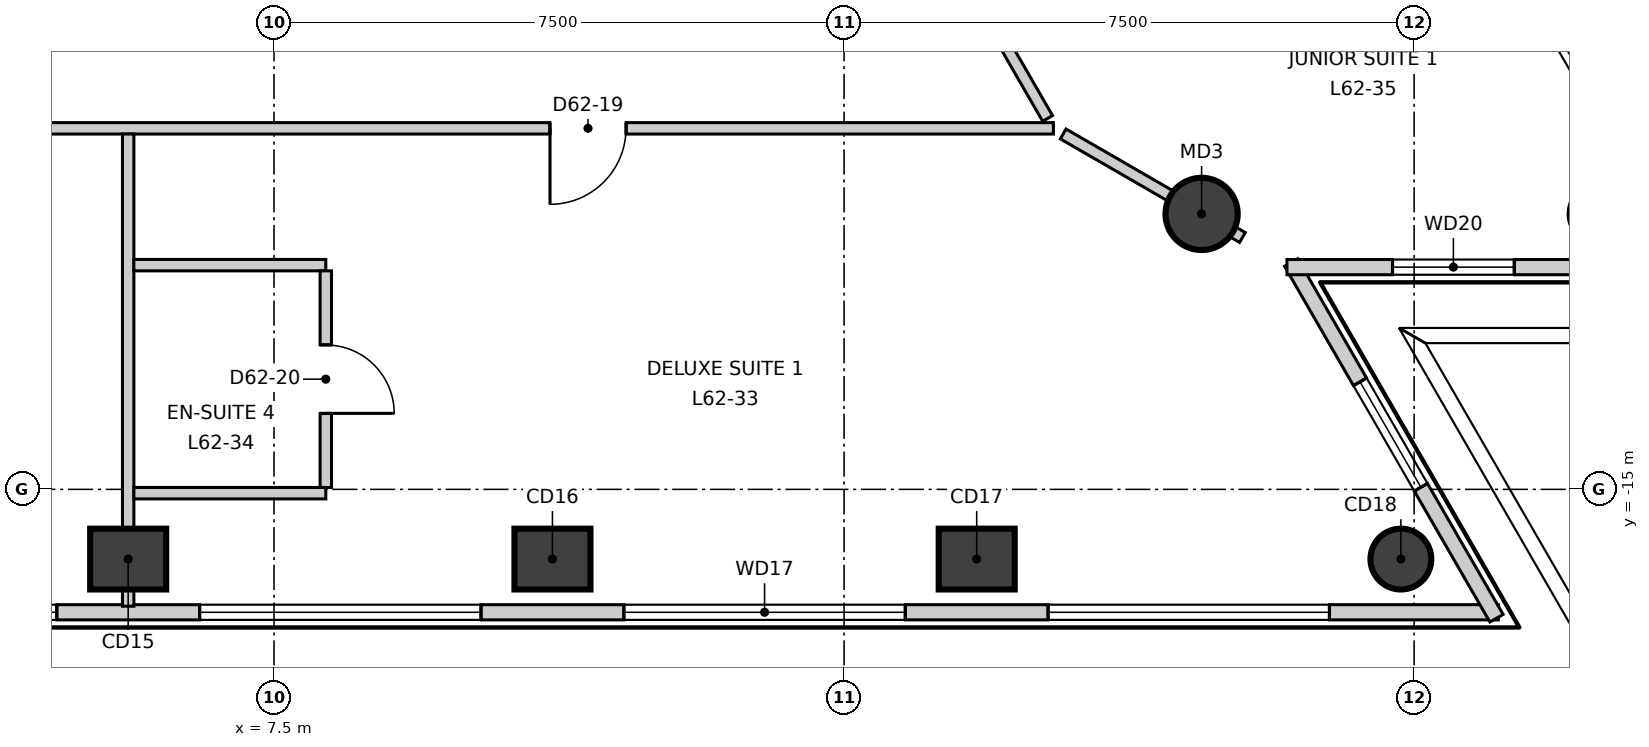
"""IFC4 building model, lengths in metres.
Left out: names, types, materials, properties, quantities, classifications, styles, units other than length and angle.
Written with IfcOpenShell. Run it as: python <this file> out.ifc"""

import sys

from ifc_helpers import new_model, si_unit, direction, frame, frame_2d, origin, origin_2d, place, context, subcontext, project, spatial, rectangle, circle, extrude, element, fill, save


model = new_model("IFC4")
c1 = context("Model", 3, precision=1e-05, world=origin(), true_north=direction((0.0, 1.0)))
c2 = subcontext(c1, "Body", "Model", "MODEL_VIEW")
j1 = project(units=[si_unit("LENGTHUNIT", "METRE"), si_unit("PLANEANGLEUNIT", "RADIAN")], contexts=[c1])
p1 = place(None, origin())
s1 = spatial("IfcSite", under=j1, at=p1, CompositionType="ELEMENT")
p2 = place(p1, origin())
s2 = spatial("IfcBuilding", under=s1, at=p2, CompositionType="ELEMENT")
p3 = place(p2, frame((0.0, 0.0, 268.3)))
s3 = spatial("IfcBuildingStorey", under=s2, at=p3, CompositionType="ELEMENT", Elevation=268.3)
for number, where, z_axis, x_axis in (
    (1, (5.581, -15.917, -0.3), (0.0, 0.0, 1.0), (1.0, 0.0, 0.0)),
    (2, (11.163, -15.917, -0.3), (0.0, 0.0, 1.0), (1.0, 0.0, 0.0)),
    (3, (16.745, -15.917, -0.3), (0.0, 0.0, 1.0), (1.0, 0.0, 0.0)),
):
    element("IfcColumn", number, at=place(p3, frame(where, z_axis=z_axis, x_axis=x_axis)), inside=s3, PredefinedType="COLUMN", context=c2, shape_type="SweptSolid", body=[
        extrude(rectangle(XDim=1.0, YDim=0.8, at=origin_2d()), origin(), (0.0, 0.0, 1.0), 3.6),
    ])
p4 = place(p3, frame((22.326, -15.917, -0.3), z_axis=(0.0, 0.0, 1.0), x_axis=(1.0, 0.0, 0.0)))
e4 = element("IfcColumn", 4, at=p4, inside=s3, PredefinedType="COLUMN", context=c2, shape_type="SweptSolid", body=[
    extrude(circle(Radius=0.4, at=origin_2d()), origin(), (0.0, 0.0, 1.0), 3.6),
])
p5 = place(p3, frame((19.704, -11.376, -0.3), z_axis=(0.0, 0.0, 1.0), x_axis=(1.0, 0.0, 0.0)))
e5 = element("IfcColumn", 5, at=p5, inside=s3, PredefinedType="COLUMN", context=c2, shape_type="SweptSolid", body=[
    extrude(circle(Radius=0.475, at=origin_2d()), origin(), (0.0, 0.0, 1.0), 3.6),
])
p6 = place(p3, frame((-23.629, -16.617, 0.0), z_axis=(0.0, 0.0, 1.0), x_axis=(1.0, 0.0, 0.0)))
e6 = element("IfcWall", 6, at=p6, inside=s3, PredefinedType="ELEMENTEDWALL", context=c2, shape_type="SweptSolid", body=[
    extrude(rectangle(XDim=47.238, YDim=0.2, at=frame_2d((23.619, 0.0))), origin(), (0.0, 0.0, 1.0), 3.3),
])
p7 = place(p6, frame((2.244, 0.0, 0.9)))
e7 = element("IfcOpeningElement", 7, at=p7, cuts=e6, PredefinedType="OPENING", context=c2, shape_type="SweptSolid", body=[
    extrude(rectangle(XDim=3.7, YDim=2.2, at=frame_2d((1.85, 1.1))), frame((0.0, 0.11, 0.0), z_axis=(0.0, -1.0, 0.0), x_axis=(1.0, 0.0, 0.0)), (0.0, 0.0, 1.0), 0.22),
])
p8 = place(p6, frame((7.825, 0.0, 0.9)))
e8 = element("IfcOpeningElement", 8, at=p8, cuts=e6, PredefinedType="OPENING", context=c2, shape_type="SweptSolid", body=[
    extrude(rectangle(XDim=3.7, YDim=2.2, at=frame_2d((1.85, 1.1))), frame((0.0, 0.11, 0.0), z_axis=(0.0, -1.0, 0.0), x_axis=(1.0, 0.0, 0.0)), (0.0, 0.0, 1.0), 0.22),
])
p9 = place(p6, frame((13.407, 0.0, 0.9)))
e9 = element("IfcOpeningElement", 9, at=p9, cuts=e6, PredefinedType="OPENING", context=c2, shape_type="SweptSolid", body=[
    extrude(rectangle(XDim=3.7, YDim=2.2, at=frame_2d((1.85, 1.1))), frame((0.0, 0.11, 0.0), z_axis=(0.0, -1.0, 0.0), x_axis=(1.0, 0.0, 0.0)), (0.0, 0.0, 1.0), 0.22),
])
p10 = place(p6, frame((18.988, 0.0, 0.9)))
e10 = element("IfcOpeningElement", 10, at=p10, cuts=e6, PredefinedType="OPENING", context=c2, shape_type="SweptSolid", body=[
    extrude(rectangle(XDim=3.7, YDim=2.2, at=frame_2d((1.85, 1.1))), frame((0.0, 0.11, 0.0), z_axis=(0.0, -1.0, 0.0), x_axis=(1.0, 0.0, 0.0)), (0.0, 0.0, 1.0), 0.22),
])
p11 = place(p6, frame((24.57, 0.0, 0.9)))
e11 = element("IfcOpeningElement", 11, at=p11, cuts=e6, PredefinedType="OPENING", context=c2, shape_type="SweptSolid", body=[
    extrude(rectangle(XDim=3.7, YDim=2.2, at=frame_2d((1.85, 1.1))), frame((0.0, 0.11, 0.0), z_axis=(0.0, -1.0, 0.0), x_axis=(1.0, 0.0, 0.0)), (0.0, 0.0, 1.0), 0.22),
])
p12 = place(p6, frame((30.151, 0.0, 0.9)))
e12 = element("IfcOpeningElement", 12, at=p12, cuts=e6, PredefinedType="OPENING", context=c2, shape_type="SweptSolid", body=[
    extrude(rectangle(XDim=3.7, YDim=2.2, at=frame_2d((1.85, 1.1))), frame((0.0, 0.11, 0.0), z_axis=(0.0, -1.0, 0.0), x_axis=(1.0, 0.0, 0.0)), (0.0, 0.0, 1.0), 0.22),
])
p13 = place(p6, frame((35.733, 0.0, 0.9)))
e13 = element("IfcOpeningElement", 13, at=p13, cuts=e6, PredefinedType="OPENING", context=c2, shape_type="SweptSolid", body=[
    extrude(rectangle(XDim=3.7, YDim=2.2, at=frame_2d((1.85, 1.1))), frame((0.0, 0.11, 0.0), z_axis=(0.0, -1.0, 0.0), x_axis=(1.0, 0.0, 0.0)), (0.0, 0.0, 1.0), 0.22),
])
p14 = place(p6, frame((41.314, 0.0, 0.9)))
e14 = element("IfcOpeningElement", 14, at=p14, cuts=e6, PredefinedType="OPENING", context=c2, shape_type="SweptSolid", body=[
    extrude(rectangle(XDim=3.7, YDim=2.2, at=frame_2d((1.85, 1.1))), frame((0.0, 0.11, 0.0), z_axis=(0.0, -1.0, 0.0), x_axis=(1.0, 0.0, 0.0)), (0.0, 0.0, 1.0), 0.22),
])
p15 = place(p3, frame((23.584, -16.695, 0.0), z_axis=(0.0, 0.0, 1.0), x_axis=(-0.499972735707, 0.866041144259, 0.0)))
e15 = element("IfcWall", 15, at=p15, inside=s3, PredefinedType="ELEMENTEDWALL", context=c2, shape_type="SweptSolid", body=[
    extrude(rectangle(XDim=5.404, YDim=0.2, at=frame_2d((2.702, 0.0))), origin(), (0.0, 0.0, 1.0), 3.3),
])
p16 = place(p15, frame((1.99, 0.0, 0.9)))
e16 = element("IfcOpeningElement", 16, at=p16, cuts=e15, PredefinedType="OPENING", context=c2, shape_type="SweptSolid", body=[
    extrude(rectangle(XDim=1.6, YDim=2.2, at=frame_2d((0.8, 1.1))), frame((0.0, 0.11, 0.0), z_axis=(0.0, -1.0, 0.0), x_axis=(1.0, 0.0, 0.0)), (0.0, 0.0, 1.0), 0.22),
])
p17 = place(p3, frame((20.827, -12.076, 0.0), z_axis=(0.0, 0.0, 1.0), x_axis=(1.0, 0.0, 0.0)))
e17 = element("IfcWall", 17, at=p17, inside=s3, PredefinedType="ELEMENTEDWALL", context=c2, shape_type="SweptSolid", body=[
    extrude(rectangle(XDim=5.403, YDim=0.2, at=frame_2d((2.702, 0.0))), origin(), (0.0, 0.0, 1.0), 3.3),
])
p18 = place(p17, frame((1.39, 0.0, 0.9)))
e18 = element("IfcOpeningElement", 18, at=p18, cuts=e17, PredefinedType="OPENING", context=c2, shape_type="SweptSolid", body=[
    extrude(rectangle(XDim=1.6, YDim=2.2, at=frame_2d((0.8, 1.1))), frame((0.0, 0.11, 0.0), z_axis=(0.0, -1.0, 0.0), x_axis=(1.0, 0.0, 0.0)), (0.0, 0.0, 1.0), 0.22),
])
p19 = place(p3, frame((26.205, -12.154, 0.0), z_axis=(0.0, 0.0, 1.0), x_axis=(-0.49999909388, 0.866025926932, 0.0)))
e19 = element("IfcWall", 19, at=p19, inside=s3, PredefinedType="ELEMENTEDWALL", context=c2, shape_type="SweptSolid", body=[
    extrude(rectangle(XDim=47.236, YDim=0.2, at=frame_2d((23.618, 0.0))), origin(), (0.0, 0.0, 1.0), 3.3),
])
p20 = place(p19, frame((2.243, 0.0, 0.9)))
e20 = element("IfcOpeningElement", 20, at=p20, cuts=e19, PredefinedType="OPENING", context=c2, shape_type="SweptSolid", body=[
    extrude(rectangle(XDim=3.7, YDim=2.2, at=frame_2d((1.85, 1.1))), frame((0.0, 0.11, 0.0), z_axis=(0.0, -1.0, 0.0), x_axis=(1.0, 0.0, 0.0)), (0.0, 0.0, 1.0), 0.22),
])
p21 = place(p19, frame((7.825, 0.0, 0.9)))
e21 = element("IfcOpeningElement", 21, at=p21, cuts=e19, PredefinedType="OPENING", context=c2, shape_type="SweptSolid", body=[
    extrude(rectangle(XDim=3.7, YDim=2.2, at=frame_2d((1.85, 1.1))), frame((0.0, 0.11, 0.0), z_axis=(0.0, -1.0, 0.0), x_axis=(1.0, 0.0, 0.0)), (0.0, 0.0, 1.0), 0.22),
])
p22 = place(p19, frame((13.406, 0.0, 0.9)))
e22 = element("IfcOpeningElement", 22, at=p22, cuts=e19, PredefinedType="OPENING", context=c2, shape_type="SweptSolid", body=[
    extrude(rectangle(XDim=3.7, YDim=2.2, at=frame_2d((1.85, 1.1))), frame((0.0, 0.11, 0.0), z_axis=(0.0, -1.0, 0.0), x_axis=(1.0, 0.0, 0.0)), (0.0, 0.0, 1.0), 0.22),
])
p23 = place(p19, frame((18.987, 0.0, 0.9)))
e23 = element("IfcOpeningElement", 23, at=p23, cuts=e19, PredefinedType="OPENING", context=c2, shape_type="SweptSolid", body=[
    extrude(rectangle(XDim=3.7, YDim=2.2, at=frame_2d((1.85, 1.1))), frame((0.0, 0.11, 0.0), z_axis=(0.0, -1.0, 0.0), x_axis=(1.0, 0.0, 0.0)), (0.0, 0.0, 1.0), 0.22),
])
p24 = place(p19, frame((24.569, 0.0, 0.9)))
e24 = element("IfcOpeningElement", 24, at=p24, cuts=e19, PredefinedType="OPENING", context=c2, shape_type="SweptSolid", body=[
    extrude(rectangle(XDim=3.7, YDim=2.2, at=frame_2d((1.85, 1.1))), frame((0.0, 0.11, 0.0), z_axis=(0.0, -1.0, 0.0), x_axis=(1.0, 0.0, 0.0)), (0.0, 0.0, 1.0), 0.22),
])
p25 = place(p19, frame((30.15, 0.0, 0.9)))
e25 = element("IfcOpeningElement", 25, at=p25, cuts=e19, PredefinedType="OPENING", context=c2, shape_type="SweptSolid", body=[
    extrude(rectangle(XDim=3.7, YDim=2.2, at=frame_2d((1.85, 1.1))), frame((0.0, 0.11, 0.0), z_axis=(0.0, -1.0, 0.0), x_axis=(1.0, 0.0, 0.0)), (0.0, 0.0, 1.0), 0.22),
])
p26 = place(p19, frame((35.732, 0.0, 0.9)))
e26 = element("IfcOpeningElement", 26, at=p26, cuts=e19, PredefinedType="OPENING", context=c2, shape_type="SweptSolid", body=[
    extrude(rectangle(XDim=3.7, YDim=2.2, at=frame_2d((1.85, 1.1))), frame((0.0, 0.11, 0.0), z_axis=(0.0, -1.0, 0.0), x_axis=(1.0, 0.0, 0.0)), (0.0, 0.0, 1.0), 0.22),
])
p27 = place(p19, frame((41.313, 0.0, 0.9)))
e27 = element("IfcOpeningElement", 27, at=p27, cuts=e19, PredefinedType="OPENING", context=c2, shape_type="SweptSolid", body=[
    extrude(rectangle(XDim=3.7, YDim=2.2, at=frame_2d((1.85, 1.1))), frame((0.0, 0.11, 0.0), z_axis=(0.0, -1.0, 0.0), x_axis=(1.0, 0.0, 0.0)), (0.0, 0.0, 1.0), 0.22),
])
p28 = place(p3, frame((-17.604, -10.25, 0.0), z_axis=(0.0, 0.0, 1.0), x_axis=(1.0, 0.0, 0.0)))
e28 = element("IfcWall", 28, at=p28, inside=s3, PredefinedType="PARTITIONING", context=c2, shape_type="SweptSolid", body=[
    extrude(rectangle(XDim=35.358, YDim=0.15, at=frame_2d((17.679, 0.0))), origin(), (0.0, 0.0, 1.0), 3.3),
])
p29 = place(p28, frame((2.6, 0.0, 0.0)))
e29 = element("IfcOpeningElement", 29, at=p29, cuts=e28, PredefinedType="OPENING", context=c2, shape_type="SweptSolid", body=[
    extrude(rectangle(XDim=1.0, YDim=2.1, at=frame_2d((0.5, 1.05))), frame((0.0, 0.085, 0.0), z_axis=(0.0, -1.0, 0.0), x_axis=(1.0, 0.0, 0.0)), (0.0, 0.0, 1.0), 0.17),
])
p30 = place(p28, frame((8.391, 0.0, 0.0)))
e30 = element("IfcOpeningElement", 30, at=p30, cuts=e28, PredefinedType="OPENING", context=c2, shape_type="SweptSolid", body=[
    extrude(rectangle(XDim=1.0, YDim=2.1, at=frame_2d((0.5, 1.05))), frame((0.0, 0.085, 0.0), z_axis=(0.0, -1.0, 0.0), x_axis=(1.0, 0.0, 0.0)), (0.0, 0.0, 1.0), 0.17),
])
p31 = place(p28, frame((20.473, 0.0, 0.0)))
e31 = element("IfcOpeningElement", 31, at=p31, cuts=e28, PredefinedType="OPENING", context=c2, shape_type="SweptSolid", body=[
    extrude(rectangle(XDim=1.0, YDim=2.1, at=frame_2d((0.5, 1.05))), frame((0.0, 0.085, 0.0), z_axis=(0.0, -1.0, 0.0), x_axis=(1.0, 0.0, 0.0)), (0.0, 0.0, 1.0), 0.17),
])
p32 = place(p28, frame((14.973, 0.0, 0.0)))
e32 = element("IfcOpeningElement", 32, at=p32, cuts=e28, PredefinedType="OPENING", context=c2, shape_type="SweptSolid", body=[
    extrude(rectangle(XDim=0.9, YDim=2.1, at=frame_2d((0.45, 1.05))), frame((0.0, 0.085, 0.0), z_axis=(0.0, -1.0, 0.0), x_axis=(1.0, 0.0, 0.0)), (0.0, 0.0, 1.0), 0.17),
])
p33 = place(p28, frame((17.173, 0.0, 0.0)))
e33 = element("IfcOpeningElement", 33, at=p33, cuts=e28, PredefinedType="OPENING", context=c2, shape_type="SweptSolid", body=[
    extrude(rectangle(XDim=0.9, YDim=2.1, at=frame_2d((0.45, 1.05))), frame((0.0, 0.085, 0.0), z_axis=(0.0, -1.0, 0.0), x_axis=(1.0, 0.0, 0.0)), (0.0, 0.0, 1.0), 0.17),
])
p34 = place(p28, frame((28.735, 0.0, 0.0)))
e34 = element("IfcOpeningElement", 34, at=p34, cuts=e28, PredefinedType="OPENING", context=c2, shape_type="SweptSolid", body=[
    extrude(rectangle(XDim=1.0, YDim=2.1, at=frame_2d((0.5, 1.05))), frame((0.0, 0.085, 0.0), z_axis=(0.0, -1.0, 0.0), x_axis=(1.0, 0.0, 0.0)), (0.0, 0.0, 1.0), 0.17),
])
p35 = place(p3, frame((17.883, -10.324, 0.0), z_axis=(0.0, 0.0, 1.0), x_axis=(0.865910811146, -0.500198427768, 0.0)))
e35 = element("IfcWall", 35, at=p35, inside=s3, PredefinedType="PARTITIONING", context=c2, shape_type="SweptSolid", body=[
    extrude(rectangle(XDim=2.723, YDim=0.15, at=frame_2d((1.362, 0.0))), origin(), (0.0, 0.0, 1.0), 2.8),
])
p36 = place(p3, frame((0.075, 20.37, 0.0), z_axis=(0.0, 0.0, 1.0), x_axis=(0.499988971979, -0.866031770721, 0.0)))
e36 = element("IfcWall", 36, at=p36, inside=s3, PredefinedType="PARTITIONING", context=c2, shape_type="SweptSolid", body=[
    extrude(rectangle(XDim=35.207, YDim=0.15, at=frame_2d((17.604, 0.0))), origin(), (0.0, 0.0, 1.0), 3.3),
])
p37 = place(p36, frame((31.606, 0.0, 0.0)))
e37 = element("IfcOpeningElement", 37, at=p37, cuts=e36, PredefinedType="OPENING", context=c2, shape_type="SweptSolid", body=[
    extrude(rectangle(XDim=1.0, YDim=2.1, at=frame_2d((0.5, 1.05))), frame((0.0, 0.085, 0.0), z_axis=(0.0, -1.0, 0.0), x_axis=(1.0, 0.0, 0.0)), (0.0, 0.0, 1.0), 0.17),
])
p38 = place(p36, frame((24.316, 0.0, 0.0)))
e38 = element("IfcOpeningElement", 38, at=p38, cuts=e36, PredefinedType="OPENING", context=c2, shape_type="SweptSolid", body=[
    extrude(rectangle(XDim=1.0, YDim=2.1, at=frame_2d((0.5, 1.05))), frame((0.0, 0.085, 0.0), z_axis=(0.0, -1.0, 0.0), x_axis=(1.0, 0.0, 0.0)), (0.0, 0.0, 1.0), 0.17),
])
p39 = place(p36, frame((18.735, 0.0, 0.0)))
e39 = element("IfcOpeningElement", 39, at=p39, cuts=e36, PredefinedType="OPENING", context=c2, shape_type="SweptSolid", body=[
    extrude(rectangle(XDim=1.0, YDim=2.1, at=frame_2d((0.5, 1.05))), frame((0.0, 0.085, 0.0), z_axis=(0.0, -1.0, 0.0), x_axis=(1.0, 0.0, 0.0)), (0.0, 0.0, 1.0), 0.17),
])
p40 = place(p36, frame((8.154, 0.0, 0.0)))
e40 = element("IfcOpeningElement", 40, at=p40, cuts=e36, PredefinedType="OPENING", context=c2, shape_type="SweptSolid", body=[
    extrude(rectangle(XDim=1.0, YDim=2.1, at=frame_2d((0.5, 1.05))), frame((0.0, 0.085, 0.0), z_axis=(0.0, -1.0, 0.0), x_axis=(1.0, 0.0, 0.0)), (0.0, 0.0, 1.0), 0.17),
])
p41 = place(p36, frame((13.754, 0.0, 0.0)))
e41 = element("IfcOpeningElement", 41, at=p41, cuts=e36, PredefinedType="OPENING", context=c2, shape_type="SweptSolid", body=[
    extrude(rectangle(XDim=0.9, YDim=2.1, at=frame_2d((0.45, 1.05))), frame((0.0, 0.085, 0.0), z_axis=(0.0, -1.0, 0.0), x_axis=(1.0, 0.0, 0.0)), (0.0, 0.0, 1.0), 0.17),
])
p42 = place(p36, frame((11.554, 0.0, 0.0)))
e42 = element("IfcOpeningElement", 42, at=p42, cuts=e36, PredefinedType="OPENING", context=c2, shape_type="SweptSolid", body=[
    extrude(rectangle(XDim=0.9, YDim=2.1, at=frame_2d((0.45, 1.05))), frame((0.0, 0.085, 0.0), z_axis=(0.0, -1.0, 0.0), x_axis=(1.0, 0.0, 0.0)), (0.0, 0.0, 1.0), 0.17),
])
p43 = place(p36, frame((2.69, 0.0, 0.0)))
e43 = element("IfcOpeningElement", 43, at=p43, cuts=e36, PredefinedType="OPENING", context=c2, shape_type="SweptSolid", body=[
    extrude(rectangle(XDim=1.0, YDim=2.1, at=frame_2d((0.5, 1.05))), frame((0.0, 0.085, 0.0), z_axis=(0.0, -1.0, 0.0), x_axis=(1.0, 0.0, 0.0)), (0.0, 0.0, 1.0), 0.17),
])
p44 = place(p3, frame((5.581, -16.537, 0.0), z_axis=(0.0, 0.0, 1.0), x_axis=(0.0, 1.0, 0.0)))
e44 = element("IfcWall", 44, at=p44, inside=s3, PredefinedType="PARTITIONING", context=c2, shape_type="SweptSolid", body=[
    extrude(rectangle(XDim=6.212, YDim=0.15, at=frame_2d((3.106, 0.0))), origin(), (0.0, 0.0, 1.0), 3.3),
])
for number, where, z_axis, x_axis in (
    (45, (5.656, -12.05, 0.0), (0.0, 0.0, 1.0), (1.0, 0.0, 0.0)),
    (46, (5.656, -15.05, 0.0), (0.0, 0.0, 1.0), (1.0, 0.0, 0.0)),
):
    element("IfcWall", number, at=place(p3, frame(where, z_axis=z_axis, x_axis=x_axis)), inside=s3, PredefinedType="PARTITIONING", context=c2, shape_type="SweptSolid", body=[
        extrude(rectangle(XDim=2.525, YDim=0.15, at=frame_2d((1.262, 0.0))), origin(), (0.0, 0.0, 1.0), 3.3),
    ])
p45 = place(p3, frame((8.181, -14.975, 0.0), z_axis=(0.0, 0.0, 1.0), x_axis=(0.0, 1.0, 0.0)))
e47 = element("IfcWall", 47, at=p45, inside=s3, PredefinedType="PARTITIONING", context=c2, shape_type="SweptSolid", body=[
    extrude(rectangle(XDim=2.85, YDim=0.15, at=frame_2d((1.425, 0.0))), origin(), (0.0, 0.0, 1.0), 3.3),
])
p46 = place(p45, frame((0.975, 0.0, 0.0)))
e48 = element("IfcOpeningElement", 48, at=p46, cuts=e47, PredefinedType="OPENING", context=c2, shape_type="SweptSolid", body=[
    extrude(rectangle(XDim=0.9, YDim=2.1, at=frame_2d((0.45, 1.05))), frame((0.0, 0.085, 0.0), z_axis=(0.0, -1.0, 0.0), x_axis=(1.0, 0.0, 0.0)), (0.0, 0.0, 1.0), 0.17),
])
p47 = place(p11, origin())
e49 = element("IfcWindow", 49, at=p47, inside=s3, PartitioningType="SINGLE_PANEL", PredefinedType="WINDOW", context=c2, shape_type="SweptSolid", body=[
    extrude(rectangle(XDim=3.7, YDim=2.2, at=frame_2d((1.85, 1.1))), frame((0.0, 0.03, 0.0), z_axis=(0.0, -1.0, 0.0), x_axis=(1.0, 0.0, 0.0)), (0.0, 0.0, 1.0), 0.06),
])
fill(e11, e49)
p48 = place(p12, origin())
e50 = element("IfcWindow", 50, at=p48, inside=s3, PartitioningType="SINGLE_PANEL", PredefinedType="WINDOW", context=c2, shape_type="SweptSolid", body=[
    extrude(rectangle(XDim=3.7, YDim=2.2, at=frame_2d((1.85, 1.1))), frame((0.0, 0.03, 0.0), z_axis=(0.0, -1.0, 0.0), x_axis=(1.0, 0.0, 0.0)), (0.0, 0.0, 1.0), 0.06),
])
fill(e12, e50)
p49 = place(p13, origin())
e51 = element("IfcWindow", 51, at=p49, inside=s3, PartitioningType="SINGLE_PANEL", PredefinedType="WINDOW", context=c2, shape_type="SweptSolid", body=[
    extrude(rectangle(XDim=3.7, YDim=2.2, at=frame_2d((1.85, 1.1))), frame((0.0, 0.03, 0.0), z_axis=(0.0, -1.0, 0.0), x_axis=(1.0, 0.0, 0.0)), (0.0, 0.0, 1.0), 0.06),
])
fill(e13, e51)
p50 = place(p14, origin())
e52 = element("IfcWindow", 52, at=p50, inside=s3, PartitioningType="SINGLE_PANEL", PredefinedType="WINDOW", context=c2, shape_type="SweptSolid", body=[
    extrude(rectangle(XDim=3.7, YDim=2.2, at=frame_2d((1.85, 1.1))), frame((0.0, 0.03, 0.0), z_axis=(0.0, -1.0, 0.0), x_axis=(1.0, 0.0, 0.0)), (0.0, 0.0, 1.0), 0.06),
])
fill(e14, e52)
p51 = place(p16, origin())
e53 = element("IfcWindow", 53, at=p51, inside=s3, PartitioningType="SINGLE_PANEL", PredefinedType="WINDOW", context=c2, shape_type="SweptSolid", body=[
    extrude(rectangle(XDim=1.6, YDim=2.2, at=frame_2d((0.8, 1.1))), frame((0.0, 0.03, 0.0), z_axis=(0.0, -1.0, 0.0), x_axis=(1.0, 0.0, 0.0)), (0.0, 0.0, 1.0), 0.06),
])
fill(e16, e53)
p52 = place(p18, origin())
e54 = element("IfcWindow", 54, at=p52, inside=s3, PartitioningType="SINGLE_PANEL", PredefinedType="WINDOW", context=c2, shape_type="SweptSolid", body=[
    extrude(rectangle(XDim=1.6, YDim=2.2, at=frame_2d((0.8, 1.1))), frame((0.0, 0.03, 0.0), z_axis=(0.0, -1.0, 0.0), x_axis=(1.0, 0.0, 0.0)), (0.0, 0.0, 1.0), 0.06),
])
fill(e18, e54)
p53 = place(p20, origin())
e55 = element("IfcWindow", 55, at=p53, inside=s3, PartitioningType="SINGLE_PANEL", PredefinedType="WINDOW", context=c2, shape_type="SweptSolid", body=[
    extrude(rectangle(XDim=3.7, YDim=2.2, at=frame_2d((1.85, 1.1))), frame((0.0, 0.03, 0.0), z_axis=(0.0, -1.0, 0.0), x_axis=(1.0, 0.0, 0.0)), (0.0, 0.0, 1.0), 0.06),
])
fill(e20, e55)
p54 = place(p34, origin())
e56 = element("IfcDoor", 56, at=p54, inside=s3, OperationType="SINGLE_SWING_LEFT", PredefinedType="DOOR", context=c2, shape_type="SweptSolid", body=[
    extrude(rectangle(XDim=1.0, YDim=2.1, at=frame_2d((0.5, 1.05))), frame((0.0, 0.025, 0.0), z_axis=(0.0, -1.0, 0.0), x_axis=(1.0, 0.0, 0.0)), (0.0, 0.0, 1.0), 0.05),
])
fill(e34, e56)
p55 = place(p46, origin())
e57 = element("IfcDoor", 57, at=p55, inside=s3, OperationType="SINGLE_SWING_LEFT", PredefinedType="DOOR", context=c2, shape_type="SweptSolid", body=[
    extrude(rectangle(XDim=0.9, YDim=2.1, at=frame_2d((0.45, 1.05))), frame((0.0, 0.025, 0.0), z_axis=(0.0, -1.0, 0.0), x_axis=(1.0, 0.0, 0.0)), (0.0, 0.0, 1.0), 0.05),
])
fill(e48, e57)
save(model, sys.argv[1])
